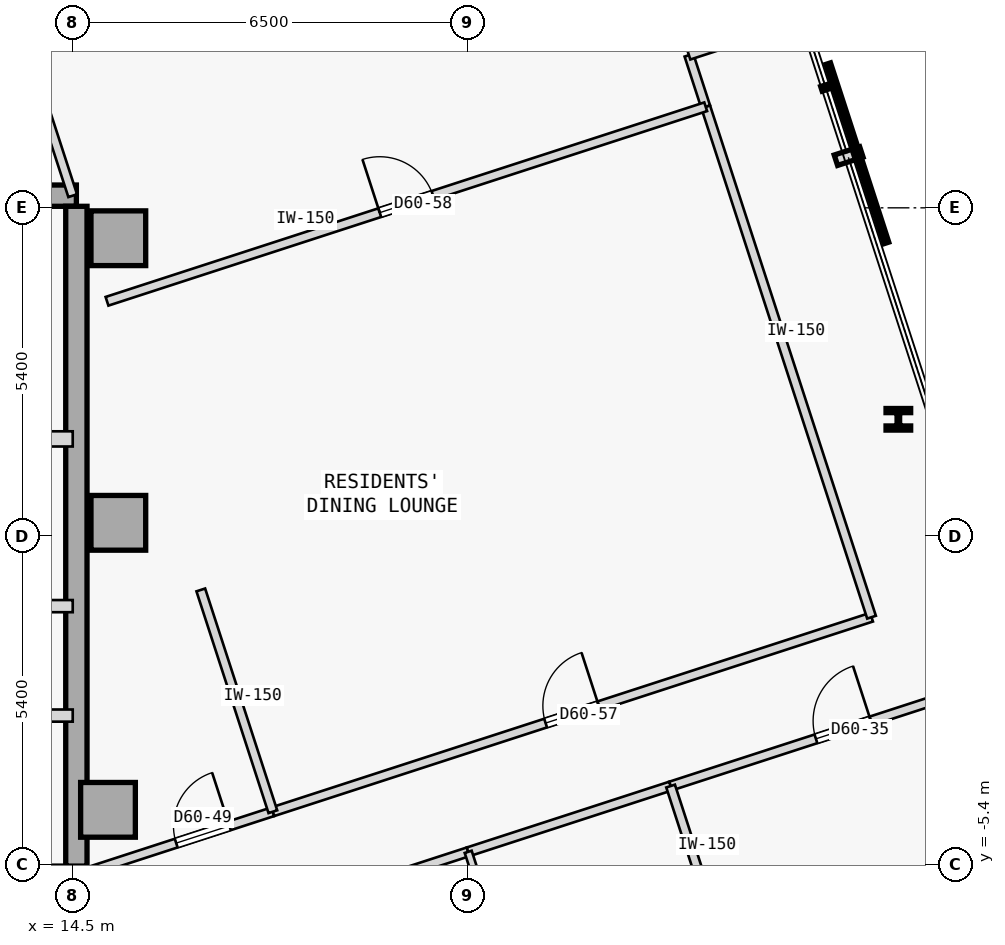
"""IFC4 building model, lengths in metres.
Left out: names, types, materials, properties, quantities, classifications, styles, units other than length and angle.
Written with IfcOpenShell. Run it as: python <this file> out.ifc"""

import sys

from ifc_helpers import new_model, si_unit, direction, frame, frame_2d, origin, origin_2d, place, context, subcontext, project, spatial, rectangle, i_section, extrude, element, fill, save


model = new_model("IFC4")
c1 = context("Model", 3, precision=1e-05, world=origin(), true_north=direction((0.0, 1.0)))
c2 = subcontext(c1, "Body", "Model", "MODEL_VIEW")
j1 = project(units=[si_unit("LENGTHUNIT", "METRE"), si_unit("PLANEANGLEUNIT", "RADIAN")], contexts=[c1])
p1 = place(None, origin())
s1 = spatial("IfcSite", under=j1, at=p1, CompositionType="ELEMENT")
p2 = place(p1, origin())
s2 = spatial("IfcBuilding", under=s1, at=p2, CompositionType="ELEMENT")
p3 = place(p2, frame((0.0, 0.0, 227.65)))
s3 = spatial("IfcBuildingStorey", under=s2, at=p3, CompositionType="ELEMENT", Elevation=227.65)
for number, where, z_axis, x_axis in (
    (1, (15.25, 4.9, 0.0), (0.0, 0.0, 1.0), (1.0, 0.0, 0.0)),
    (2, (15.25, 0.22, 0.0), (0.0, 0.0, 1.0), (1.0, 0.0, 0.0)),
    (3, (15.08, -4.5, 0.0), (0.0, 0.0, 1.0), (1.0, 0.0, 0.0)),
):
    element("IfcColumn", number, at=place(p3, frame(where, z_axis=z_axis, x_axis=x_axis)), inside=s3, PredefinedType="COLUMN", context=c2, shape_type="SweptSolid", body=[
        extrude(rectangle(XDim=0.9, YDim=0.9, at=origin_2d()), origin(), (0.0, 0.0, 1.0), 3.35),
    ])
p4 = place(p3, frame((3.15, 5.6, 0.0), z_axis=(0.0, 0.0, 1.0), x_axis=(1.0, 0.0, 0.0)))
e4 = element("IfcWall", 4, at=p4, inside=s3, PredefinedType="SHEAR", context=c2, shape_type="SweptSolid", body=[
    extrude(rectangle(XDim=11.41, YDim=0.35, at=frame_2d((5.705, 0.0))), origin(), (0.0, 0.0, 1.0), 3.125),
])
p5 = place(p3, frame((14.56, -5.425, 0.0), z_axis=(0.0, 0.0, 1.0), x_axis=(0.0, 1.0, 0.0)))
e5 = element("IfcWall", 5, at=p5, inside=s3, PredefinedType="SHEAR", context=c2, shape_type="SweptSolid", body=[
    extrude(rectangle(XDim=10.85, YDim=0.35, at=frame_2d((5.425, 0.0))), origin(), (0.0, 0.0, 1.0), 3.125),
])
p6 = place(p3, frame((28.078, 1.922, 0.0), z_axis=(0.0, 0.0, 1.0), x_axis=(1.0, 0.0, 0.0)))
e6 = element("IfcColumn", 6, at=p6, inside=s3, PredefinedType="COLUMN", context=c2, shape_type="SweptSolid", body=[
    extrude(i_section(OverallWidth=0.405, OverallDepth=0.355, WebThickness=0.042, FlangeThickness=0.068, FilletRadius=0.015, at=origin_2d()), origin(), (0.0, 0.0, 1.0), 3.35),
])
p7 = place(p3, frame((10.9, 1.6, 0.0), z_axis=(0.0, 0.0, 1.0), x_axis=(1.0, 0.0, 0.0)))
e7 = element("IfcWall", 7, at=p7, inside=s3, PredefinedType="STANDARD", context=c2, shape_type="SweptSolid", body=[
    extrude(rectangle(XDim=3.6, YDim=0.25, at=frame_2d((1.8, 0.0))), origin(), (0.0, 0.0, 1.0), 3.125),
])
p8 = place(p7, frame((1.62, 0.0, 0.0)))
e8 = element("IfcOpeningElement", 8, at=p8, cuts=e7, PredefinedType="OPENING", context=c2, shape_type="SweptSolid", body=[
    extrude(rectangle(XDim=1.05, YDim=2.15, at=frame_2d((0.525, 1.075))), frame((0.0, 0.135, 0.0), z_axis=(0.0, -1.0, 0.0), x_axis=(1.0, 0.0, 0.0)), (0.0, 0.0, 1.0), 0.27),
])
p9 = place(p3, frame((11.55, -1.15, 0.0), z_axis=(0.0, 0.0, 1.0), x_axis=(1.0, 0.0, 0.0)))
e9 = element("IfcWall", 9, at=p9, inside=s3, PredefinedType="STANDARD", context=c2, shape_type="SweptSolid", body=[
    extrude(rectangle(XDim=2.95, YDim=0.2, at=frame_2d((1.475, 0.0))), origin(), (0.0, 0.0, 1.0), 3.125),
])
p10 = place(p9, frame((0.75, 0.0, 0.0)))
e10 = element("IfcOpeningElement", 10, at=p10, cuts=e9, PredefinedType="OPENING", context=c2, shape_type="SweptSolid", body=[
    extrude(rectangle(XDim=1.05, YDim=2.18, at=frame_2d((0.525, 1.09))), frame((0.0, 0.11, 0.0), z_axis=(0.0, -1.0, 0.0), x_axis=(1.0, 0.0, 0.0)), (0.0, 0.0, 1.0), 0.22),
])
p11 = place(p3, frame((3.7, -2.95, 0.0), z_axis=(0.0, 0.0, 1.0), x_axis=(1.0, 0.0, 0.0)))
e11 = element("IfcWall", 11, at=p11, inside=s3, PredefinedType="STANDARD", context=c2, shape_type="SweptSolid", body=[
    extrude(rectangle(XDim=10.8, YDim=0.2, at=frame_2d((5.4, 0.0))), origin(), (0.0, 0.0, 1.0), 3.125),
])
p12 = place(p11, frame((0.53, 0.0, 0.0)))
e12 = element("IfcOpeningElement", 12, at=p12, cuts=e11, PredefinedType="OPENING", context=c2, shape_type="SweptSolid", body=[
    extrude(rectangle(XDim=1.1, YDim=2.15, at=frame_2d((0.55, 1.075))), frame((0.0, 0.11, 0.0), z_axis=(0.0, -1.0, 0.0), x_axis=(1.0, 0.0, 0.0)), (0.0, 0.0, 1.0), 0.22),
])
p13 = place(p11, frame((3.71, 0.0, 0.0)))
e13 = element("IfcOpeningElement", 13, at=p13, cuts=e11, PredefinedType="OPENING", context=c2, shape_type="SweptSolid", body=[
    extrude(rectangle(XDim=0.92, YDim=2.15, at=frame_2d((0.46, 1.075))), frame((0.0, 0.11, 0.0), z_axis=(0.0, -1.0, 0.0), x_axis=(1.0, 0.0, 0.0)), (0.0, 0.0, 1.0), 0.22),
])
p14 = place(p11, frame((8.03, 0.0, 0.0)))
e14 = element("IfcOpeningElement", 14, at=p14, cuts=e11, PredefinedType="OPENING", context=c2, shape_type="SweptSolid", body=[
    extrude(rectangle(XDim=0.92, YDim=2.15, at=frame_2d((0.46, 1.075))), frame((0.0, 0.11, 0.0), z_axis=(0.0, -1.0, 0.0), x_axis=(1.0, 0.0, 0.0)), (0.0, 0.0, 1.0), 0.22),
])
p15 = place(p3, frame((24.332, -4.109, 0.0), z_axis=(0.0, 0.0, 1.0), x_axis=(0.951058083458, 0.309012171103, 0.0)))
e15 = element("IfcWall", 15, at=p15, inside=s3, PredefinedType="PARTITIONING", context=c2, shape_type="SweptSolid", body=[
    extrude(rectangle(XDim=5.976, YDim=0.15, at=frame_2d((2.988, 0.0))), origin(), (0.0, 0.0, 1.0), 3.125),
])
p16 = place(p15, frame((2.513, 0.0, 0.0)))
e16 = element("IfcOpeningElement", 16, at=p16, cuts=e15, PredefinedType="OPENING", context=c2, shape_type="SweptSolid", body=[
    extrude(rectangle(XDim=0.95, YDim=2.15, at=frame_2d((0.475, 1.075))), frame((0.0, 0.085, 0.0), z_axis=(0.0, -1.0, 0.0), x_axis=(1.0, 0.0, 0.0)), (0.0, 0.0, 1.0), 0.17),
])
p17 = place(p3, frame((16.866, -6.535, 0.0), z_axis=(0.0, 0.0, 1.0), x_axis=(0.951041492154, 0.309063230101, 0.0)))
e17 = element("IfcWall", 17, at=p17, inside=s3, PredefinedType="PARTITIONING", context=c2, shape_type="SweptSolid", body=[
    extrude(rectangle(XDim=4.35, YDim=0.15, at=frame_2d((2.175, 0.0))), origin(), (0.0, 0.0, 1.0), 3.125),
])
p18 = place(p3, frame((21.003, -5.19, 0.0), z_axis=(0.0, 0.0, 1.0), x_axis=(0.951055596592, 0.309019824916, 0.0)))
e18 = element("IfcWall", 18, at=p18, inside=s3, PredefinedType="PARTITIONING", context=c2, shape_type="SweptSolid", body=[
    extrude(rectangle(XDim=3.5, YDim=0.15, at=frame_2d((1.75, 0.0))), origin(), (0.0, 0.0, 1.0), 3.125),
])
p19 = place(p3, frame((14.5, -5.6, 0.0), z_axis=(0.0, 0.0, 1.0), x_axis=(0.951047546178, 0.309044600193, 0.0)))
e19 = element("IfcWall", 19, at=p19, inside=s3, PredefinedType="PARTITIONING", context=c2, shape_type="SweptSolid", body=[
    extrude(rectangle(XDim=3.461, YDim=0.15, at=frame_2d((1.73, 0.0))), origin(), (0.0, 0.0, 1.0), 3.125),
])
p20 = place(p19, frame((1.79, 0.0, 0.0)))
e20 = element("IfcOpeningElement", 20, at=p20, cuts=e19, PredefinedType="OPENING", context=c2, shape_type="SweptSolid", body=[
    extrude(rectangle(XDim=0.92, YDim=2.15, at=frame_2d((0.46, 1.075))), frame((0.0, 0.085, 0.0), z_axis=(0.0, -1.0, 0.0), x_axis=(1.0, 0.0, 0.0)), (0.0, 0.0, 1.0), 0.17),
])
p21 = place(p3, frame((17.791, -4.531, 0.0), z_axis=(0.0, 0.0, 1.0), x_axis=(0.951056769902, 0.309016213852, 0.0)))
e21 = element("IfcWall", 21, at=p21, inside=s3, PredefinedType="PARTITIONING", context=c2, shape_type="SweptSolid", body=[
    extrude(rectangle(XDim=10.352, YDim=0.15, at=frame_2d((5.176, 0.0))), origin(), (0.0, 0.0, 1.0), 3.125),
])
p22 = place(p21, frame((4.716, 0.0, 0.0)))
e22 = element("IfcOpeningElement", 22, at=p22, cuts=e21, PredefinedType="OPENING", context=c2, shape_type="SweptSolid", body=[
    extrude(rectangle(XDim=0.92, YDim=2.15, at=frame_2d((0.46, 1.075))), frame((0.0, 0.085, 0.0), z_axis=(0.0, -1.0, 0.0), x_axis=(1.0, 0.0, 0.0)), (0.0, 0.0, 1.0), 0.17),
])
p23 = place(p3, frame((27.637, -1.332, 0.0), z_axis=(0.0, 0.0, 1.0), x_axis=(-0.309040411618, 0.951048907253, 0.0)))
e23 = element("IfcWall", 23, at=p23, inside=s3, PredefinedType="PARTITIONING", context=c2, shape_type="SweptSolid", body=[
    extrude(rectangle(XDim=8.826, YDim=0.15, at=frame_2d((4.413, 0.0))), origin(), (0.0, 0.0, 1.0), 3.125),
])
p24 = place(p3, frame((24.909, 7.062, 0.0), z_axis=(0.0, 0.0, 1.0), x_axis=(-0.30899324298, 0.951064233263, 0.0)))
e24 = element("IfcWall", 24, at=p24, inside=s3, PredefinedType="PARTITIONING", context=c2, shape_type="SweptSolid", body=[
    extrude(rectangle(XDim=0.892, YDim=0.15, at=frame_2d((0.446, 0.0))), origin(), (0.0, 0.0, 1.0), 3.125),
])
p25 = place(p3, frame((24.634, 7.91, 0.0), z_axis=(0.0, 0.0, 1.0), x_axis=(0.951054051148, 0.309024581215, 0.0)))
e25 = element("IfcWall", 25, at=p25, inside=s3, PredefinedType="PARTITIONING", context=c2, shape_type="SweptSolid", body=[
    extrude(rectangle(XDim=1.975, YDim=0.15, at=frame_2d((0.988, 0.0))), origin(), (0.0, 0.0, 1.0), 3.125),
])
p26 = place(p3, frame((25.012, -6.201, 0.0), z_axis=(0.0, 0.0, 1.0), x_axis=(-0.309028364152, 0.951052821956, 0.0)))
e26 = element("IfcWall", 26, at=p26, inside=s3, PredefinedType="PARTITIONING", context=c2, shape_type="SweptSolid", body=[
    extrude(rectangle(XDim=2.2, YDim=0.15, at=frame_2d((1.1, 0.0))), origin(), (0.0, 0.0, 1.0), 3.125),
])
p27 = place(p3, frame((21.683, -7.283, 0.0), z_axis=(0.0, 0.0, 1.0), x_axis=(-0.30892799396, 0.951085429679, 0.0)))
e27 = element("IfcWall", 27, at=p27, inside=s3, PredefinedType="PARTITIONING", context=c2, shape_type="SweptSolid", body=[
    extrude(rectangle(XDim=2.2, YDim=0.12, at=frame_2d((1.1, 0.0))), origin(), (0.0, 0.0, 1.0), 3.125),
])
p28 = place(p3, frame((17.791, -4.531, 0.0), z_axis=(0.0, 0.0, 1.0), x_axis=(-0.309018414265, 0.951056054944, 0.0)))
e28 = element("IfcWall", 28, at=p28, inside=s3, PredefinedType="PARTITIONING", context=c2, shape_type="SweptSolid", body=[
    extrude(rectangle(XDim=3.835, YDim=0.15, at=frame_2d((1.917, 0.0))), origin(), (0.0, 0.0, 1.0), 3.125),
])
p29 = place(p3, frame((14.5, 5.6, 0.0), z_axis=(0.0, 0.0, 1.0), x_axis=(-0.308974360462, 0.951070367837, 0.0)))
e29 = element("IfcWall", 29, at=p29, inside=s3, PredefinedType="PARTITIONING", context=c2, shape_type="SweptSolid", body=[
    extrude(rectangle(XDim=4.843, YDim=0.15, at=frame_2d((2.421, 0.0))), origin(), (0.0, 0.0, 1.0), 3.125),
])
p30 = place(p3, frame((15.064, 3.863, 0.0), z_axis=(0.0, 0.0, 1.0), x_axis=(0.951061448945, 0.309001812827, 0.0)))
e30 = element("IfcWall", 30, at=p30, inside=s3, PredefinedType="PARTITIONING", context=c2, shape_type="SweptSolid", body=[
    extrude(rectangle(XDim=10.352, YDim=0.15, at=frame_2d((5.176, 0.0))), origin(), (0.0, 0.0, 1.0), 3.125),
])
p31 = place(p30, frame((4.716, 0.0, 0.0)))
e31 = element("IfcOpeningElement", 31, at=p31, cuts=e30, PredefinedType="OPENING", context=c2, shape_type="SweptSolid", body=[
    extrude(rectangle(XDim=0.92, YDim=2.15, at=frame_2d((0.46, 1.075))), frame((0.0, 0.085, 0.0), z_axis=(0.0, -1.0, 0.0), x_axis=(1.0, 0.0, 0.0)), (0.0, 0.0, 1.0), 0.17),
])
p32 = place(p16, origin())
e32 = element("IfcDoor", 32, at=p32, inside=s3, OperationType="SINGLE_SWING_RIGHT", PredefinedType="DOOR", context=c2, shape_type="SweptSolid", body=[
    extrude(rectangle(XDim=0.95, YDim=2.15, at=frame_2d((0.475, 1.075))), frame((0.0, 0.025, 0.0), z_axis=(0.0, -1.0, 0.0), x_axis=(1.0, 0.0, 0.0)), (0.0, 0.0, 1.0), 0.05),
])
fill(e16, e32)
p33 = place(p20, origin())
e33 = element("IfcDoor", 33, at=p33, inside=s3, OperationType="SINGLE_SWING_RIGHT", PredefinedType="DOOR", context=c2, shape_type="SweptSolid", body=[
    extrude(rectangle(XDim=0.92, YDim=2.15, at=frame_2d((0.46, 1.075))), frame((0.0, 0.025, 0.0), z_axis=(0.0, -1.0, 0.0), x_axis=(1.0, 0.0, 0.0)), (0.0, 0.0, 1.0), 0.05),
])
fill(e20, e33)
p34 = place(p22, origin())
e34 = element("IfcDoor", 34, at=p34, inside=s3, OperationType="SINGLE_SWING_RIGHT", PredefinedType="DOOR", context=c2, shape_type="SweptSolid", body=[
    extrude(rectangle(XDim=0.92, YDim=2.15, at=frame_2d((0.46, 1.075))), frame((0.0, 0.025, 0.0), z_axis=(0.0, -1.0, 0.0), x_axis=(1.0, 0.0, 0.0)), (0.0, 0.0, 1.0), 0.05),
])
fill(e22, e34)
p35 = place(p31, origin())
e35 = element("IfcDoor", 35, at=p35, inside=s3, OperationType="SINGLE_SWING_LEFT", PredefinedType="DOOR", context=c2, shape_type="SweptSolid", body=[
    extrude(rectangle(XDim=0.92, YDim=2.15, at=frame_2d((0.46, 1.075))), frame((0.0, 0.025, 0.0), z_axis=(0.0, -1.0, 0.0), x_axis=(1.0, 0.0, 0.0)), (0.0, 0.0, 1.0), 0.05),
])
fill(e31, e35)
save(model, sys.argv[1])
